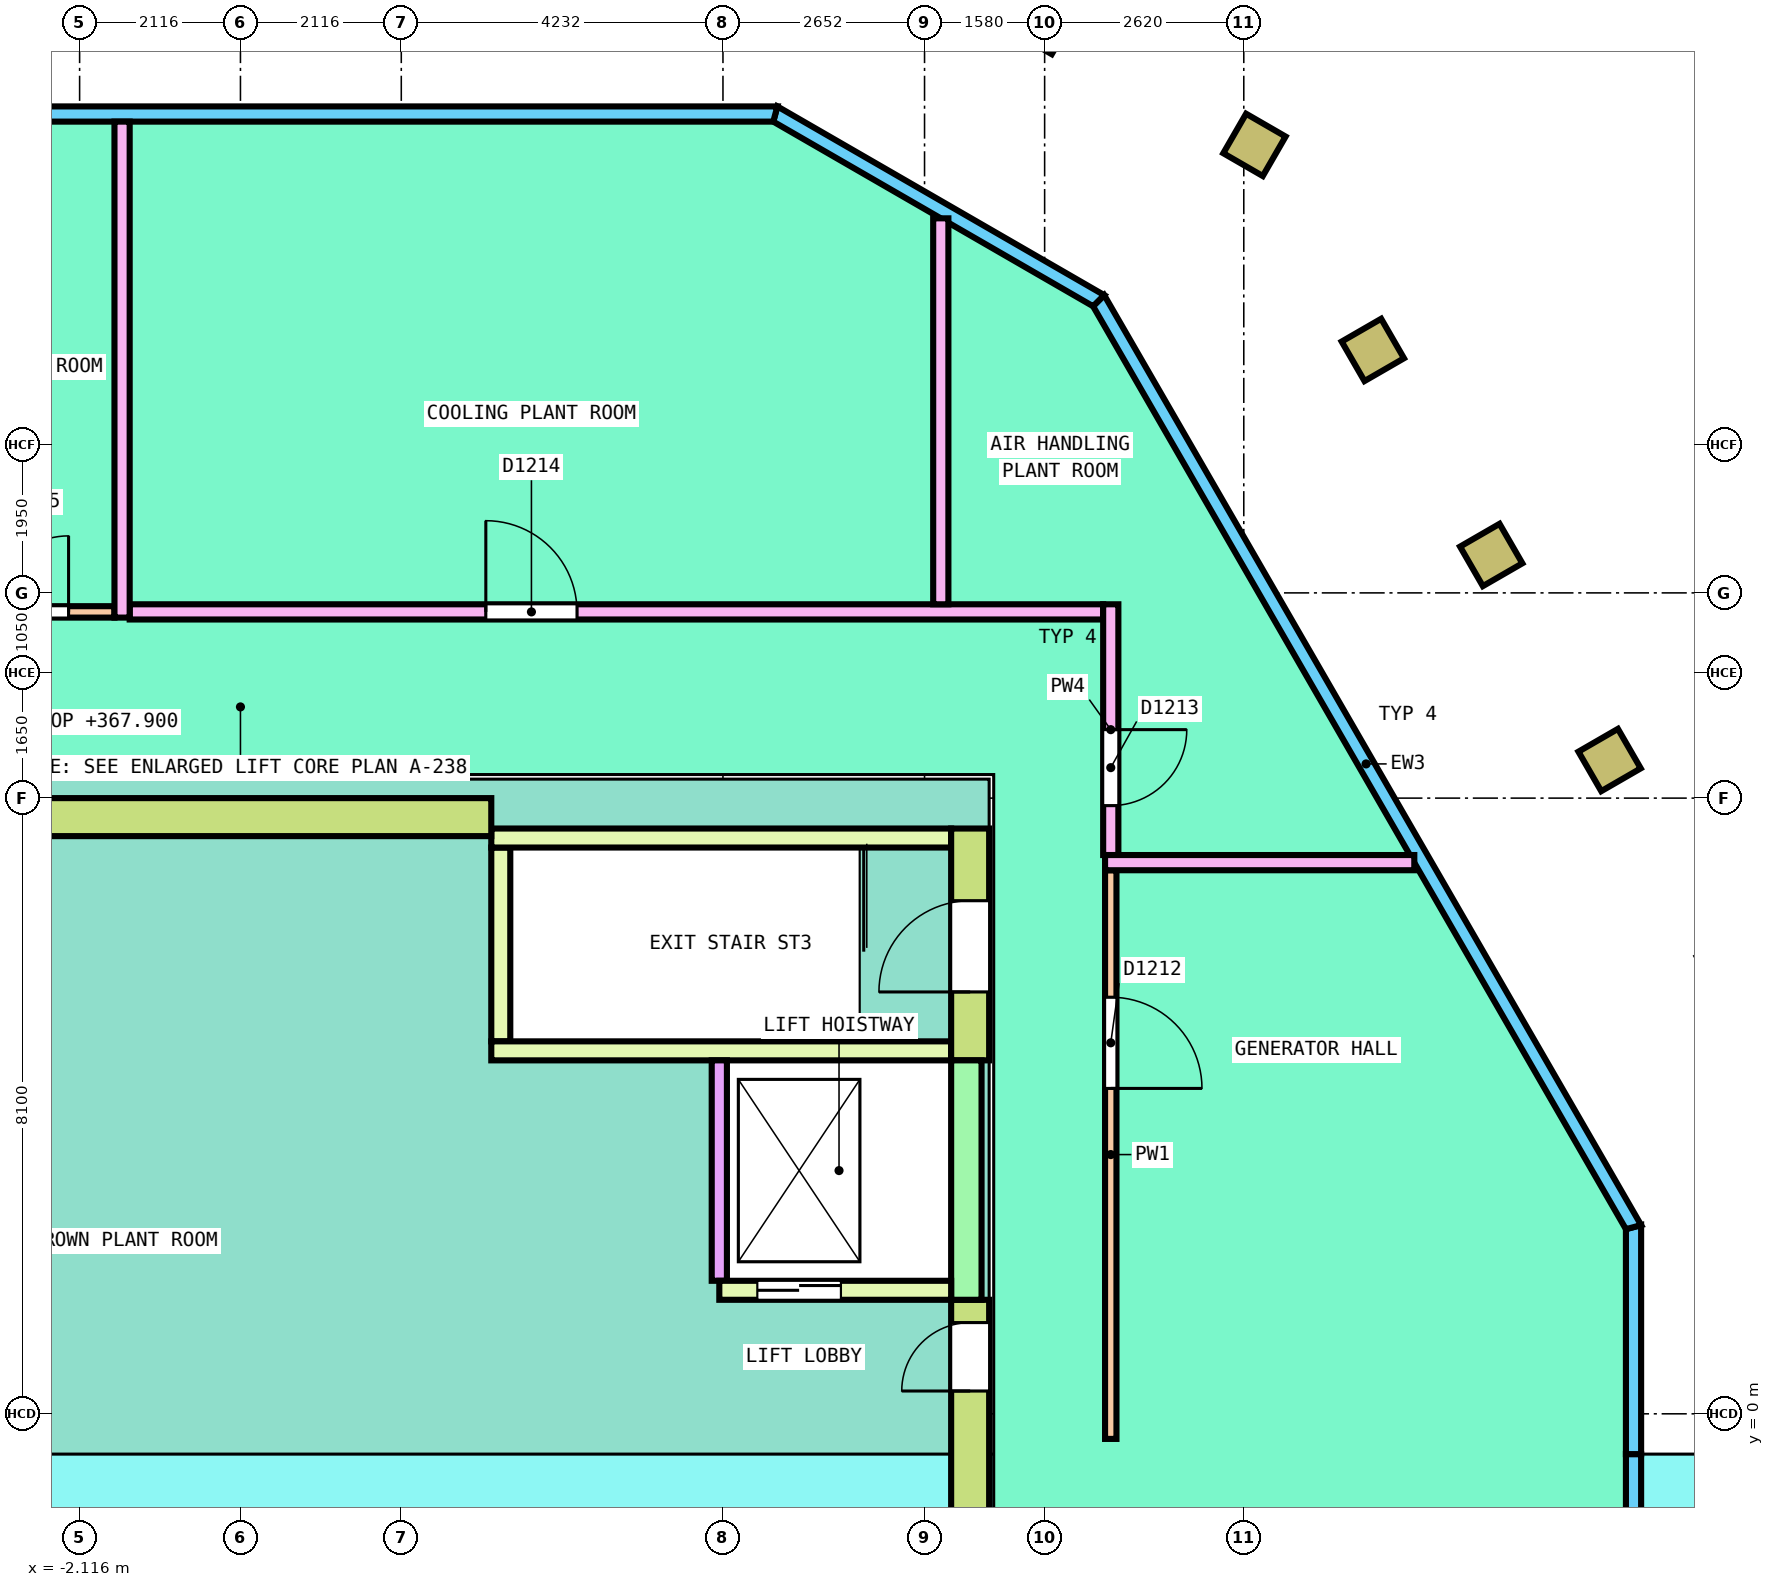
"""IFC4 building model, lengths in metres.
Left out: names, types, materials, properties, quantities, classifications, styles, units other than length and angle.
Written with IfcOpenShell. Run it as: python <this file> out.ifc"""

import sys

from ifc_helpers import new_model, si_unit, direction, frame, frame_2d, origin, origin_2d, place, context, subcontext, project, spatial, polyline, rectangle, hollow_rectangle, outline, extrude, element, fill, save


model = new_model("IFC4")
c1 = context("Model", 3, precision=1e-05, world=origin(), true_north=direction((0.0, 1.0)))
c2 = subcontext(c1, "Body", "Model", "MODEL_VIEW")
j1 = project(units=[si_unit("LENGTHUNIT", "METRE"), si_unit("PLANEANGLEUNIT", "RADIAN")], contexts=[c1])
p1 = place(None, origin())
s1 = spatial("IfcSite", under=j1, at=p1, CompositionType="ELEMENT")
p2 = place(p1, origin())
s2 = spatial("IfcBuilding", under=s1, at=p2, CompositionType="ELEMENT")
p3 = place(p2, frame((0.0, 0.0, 364.6)))
s3 = spatial("IfcBuildingStorey", under=s2, at=p3, CompositionType="ELEMENT", Elevation=364.6)
for number, where, z_axis, x_axis in (
    (1, (18.013, 8.601, 0.0), (0.0, 0.0, 1.0), (-0.5, 0.866, 0.0)),
    (2, (16.455, 11.299, 0.0), (0.0, 0.0, 1.0), (-0.5, 0.866, 0.0)),
    (3, (14.898, 13.996, 0.0), (0.0, 0.0, 1.0), (-0.5, 0.866, 0.0)),
    (4, (13.34, 16.694, 0.0), (0.0, 0.0, 1.0), (-0.866, 0.5, 0.0)),
):
    element("IfcColumn", number, at=place(p3, frame(where, z_axis=z_axis, x_axis=x_axis)), inside=s3, PredefinedType="COLUMN", context=c2, shape_type="SweptSolid", body=[
        extrude(hollow_rectangle(XDim=0.6, YDim=0.6, WallThickness=0.04, InnerFilletRadius=0.04, OuterFilletRadius=0.08, at=origin_2d()), origin(), (0.0, 0.0, 1.0), 4.0),
    ])
p4 = place(p3, frame((18.327, -2.456, 0.0), z_axis=(0.0, 0.0, 1.0), x_axis=(0.0, 1.0, 0.0)))
e5 = element("IfcWall", 5, at=p4, inside=s3, PredefinedType="SOLIDWALL", context=c2, shape_type="SweptSolid", body=[
    extrude(outline(polyline([(0.0, 0.0), (1.926, 0.0), (1.926, 4.0), (0.0, 2.074), (0.0, 0.0)])), frame((0.0, 0.1, 0.0), z_axis=(0.0, -1.0, 0.0), x_axis=(1.0, 0.0, 0.0)), (0.0, 0.0, 1.0), 0.2),
])
p5 = place(p3, frame((18.327, -0.53, 0.0), z_axis=(0.0, 0.0, 1.0), x_axis=(0.0, 1.0, 0.0)))
e6 = element("IfcWall", 6, at=p5, inside=s3, PredefinedType="SOLIDWALL", context=c2, shape_type="SweptSolid", body=[
    extrude(outline(polyline([(0.0, -0.1), (3.013, -0.1), (2.959, 0.1), (0.0, 0.1), (0.0, -0.1)])), origin(), (0.0, 0.0, 1.0), 3.8),
])
p6 = place(p3, frame((18.327, 2.456, 0.0), z_axis=(0.0, 0.0, 1.0), x_axis=(-0.499991740577, 0.866030172312, 0.0)))
e7 = element("IfcWall", 7, at=p6, inside=s3, PredefinedType="SOLIDWALL", context=c2, shape_type="SweptSolid", body=[
    extrude(outline(polyline([(-0.027, -0.1), (14.101, -0.1), (14.047, 0.1), (0.027, 0.1), (-0.027, -0.1)])), origin(), (0.0, 0.0, 1.0), 3.8),
])
p7 = place(p3, frame((11.291, 14.644, 0.0), z_axis=(0.0, 0.0, 1.0), x_axis=(-0.86601671623, 0.500015046984, 0.0)))
e8 = element("IfcWall", 8, at=p7, inside=s3, PredefinedType="SOLIDWALL", context=c2, shape_type="SweptSolid", body=[
    extrude(outline(polyline([(-0.027, -0.1), (4.938, -0.1), (4.885, 0.1), (0.027, 0.1), (-0.027, -0.1)])), origin(), (0.0, 0.0, 1.0), 3.8),
])
p8 = place(p3, frame((7.037, 17.1, 0.0), z_axis=(0.0, 0.0, 1.0), x_axis=(-1.0, 0.0, 0.0)))
e9 = element("IfcWall", 9, at=p8, inside=s3, PredefinedType="SOLIDWALL", context=c2, shape_type="SweptSolid", body=[
    extrude(outline(polyline([(-0.027, -0.1), (14.101, -0.1), (14.047, 0.1), (0.027, 0.1), (-0.027, -0.1)])), origin(), (0.0, 0.0, 1.0), 3.8),
])
p9 = place(p3, frame((9.6, -4.13, 0.0), z_axis=(0.0, 0.0, 1.0), x_axis=(0.0, 1.0, 0.0)))
e10 = element("IfcWall", 10, at=p9, inside=s3, PredefinedType="SHEAR", context=c2, shape_type="SweptSolid", body=[
    extrude(outline(polyline([(0.0, 0.0), (5.63, 0.0), (5.63, 3.8), (3.6, 3.8), (0.0, 0.4), (0.0, 0.0)])), frame((0.0, 0.25, 0.0), z_axis=(0.0, -1.0, 0.0), x_axis=(1.0, 0.0, 0.0)), (0.0, 0.0, 1.0), 0.5),
])
p10 = place(p9, frame((4.43, 0.0, 0.0)))
e11 = element("IfcOpeningElement", 11, at=p10, cuts=e10, PredefinedType="OPENING", context=c2, shape_type="SweptSolid", body=[
    extrude(rectangle(XDim=0.9, YDim=2.1, at=frame_2d((0.45, 1.05))), frame((0.0, 0.26, 0.0), z_axis=(0.0, -1.0, 0.0), x_axis=(1.0, 0.0, 0.0)), (0.0, 0.0, 1.0), 0.52),
])
p11 = place(p3, frame((3.3, 7.85, 0.0), z_axis=(0.0, 0.0, 1.0), x_axis=(-1.0, 0.0, 0.0)))
e12 = element("IfcWall", 12, at=p11, inside=s3, PredefinedType="SHEAR", context=c2, shape_type="SweptSolid", body=[
    extrude(rectangle(XDim=6.6, YDim=0.5, at=frame_2d((3.3, 0.0))), origin(), (0.0, 0.0, 1.0), 3.8),
])
p12 = place(p3, frame((9.6, 4.65, 0.0), z_axis=(0.0, 0.0, 1.0), x_axis=(0.0, 1.0, 0.0)))
e13 = element("IfcWall", 13, at=p12, inside=s3, PredefinedType="SHEAR", context=c2, shape_type="SweptSolid", body=[
    extrude(rectangle(XDim=3.05, YDim=0.5, at=frame_2d((1.525, 0.0))), origin(), (0.0, 0.0, 1.0), 3.8),
])
p13 = place(p12, frame((0.9, 0.0, 0.0)))
e14 = element("IfcOpeningElement", 14, at=p13, cuts=e13, PredefinedType="OPENING", context=c2, shape_type="SweptSolid", body=[
    extrude(rectangle(XDim=1.2, YDim=2.1, at=frame_2d((0.6, 1.05))), frame((0.0, 0.26, 0.0), z_axis=(0.0, -1.0, 0.0), x_axis=(1.0, 0.0, 0.0)), (0.0, 0.0, 1.0), 0.52),
])
p14 = place(p3, frame((3.425, 4.9, 0.0), z_axis=(0.0, 0.0, 1.0), x_axis=(0.0, 1.0, 0.0)))
e15 = element("IfcWall", 15, at=p14, inside=s3, PredefinedType="SOLIDWALL", context=c2, shape_type="SweptSolid", body=[
    extrude(rectangle(XDim=2.55, YDim=0.25, at=frame_2d((1.275, 0.0))), origin(), (0.0, 0.0, 1.0), 3.8),
])
for number, where, z_axis, x_axis in (
    (16, (3.3, 4.775, 0.0), (0.0, 0.0, 1.0), (1.0, 0.0, 0.0)),
    (17, (3.3, 7.575, 0.0), (0.0, 0.0, 1.0), (1.0, 0.0, 0.0)),
):
    element("IfcWall", number, at=place(p3, frame(where, z_axis=z_axis, x_axis=x_axis)), inside=s3, PredefinedType="SOLIDWALL", context=c2, shape_type="SweptSolid", body=[
        extrude(rectangle(XDim=6.05, YDim=0.25, at=frame_2d((3.025, 0.0))), origin(), (0.0, 0.0, 1.0), 3.8),
    ])
p15 = place(p3, frame((6.3, 1.625, 0.0), z_axis=(0.0, 0.0, 1.0), x_axis=(1.0, 0.0, 0.0)))
e18 = element("IfcWall", 18, at=p15, inside=s3, PredefinedType="SOLIDWALL", context=c2, shape_type="SweptSolid", body=[
    extrude(rectangle(XDim=3.05, YDim=0.25, at=frame_2d((1.525, 0.0))), origin(), (0.0, 0.0, 1.0), 3.8),
])
p16 = place(p15, frame((0.5, 0.0, 0.0)))
e19 = element("IfcOpeningElement", 19, at=p16, cuts=e18, PredefinedType="OPENING", context=c2, shape_type="SweptSolid", body=[
    extrude(rectangle(XDim=1.1, YDim=2.1, at=frame_2d((0.55, 1.05))), frame((0.0, 0.135, 0.0), z_axis=(0.0, -1.0, 0.0), x_axis=(1.0, 0.0, 0.0)), (0.0, 0.0, 1.0), 0.27),
])
p17 = place(p3, frame((6.3, 1.75, 0.0), z_axis=(0.0, 0.0, 1.0), x_axis=(0.0, 1.0, 0.0)))
e20 = element("IfcWall", 20, at=p17, inside=s3, PredefinedType="SOLIDWALL", context=c2, shape_type="SweptSolid", body=[
    extrude(rectangle(XDim=2.9, YDim=0.2, at=frame_2d((1.45, 0.0))), origin(), (0.0, 0.0, 1.0), 3.8),
])
p18 = place(p3, frame((9.55, 1.5, 0.0), z_axis=(0.0, 0.0, 1.0), x_axis=(0.0, 1.0, 0.0)))
e21 = element("IfcWall", 21, at=p18, inside=s3, PredefinedType="SHEAR", context=c2, shape_type="SweptSolid", body=[
    extrude(rectangle(XDim=3.15, YDim=0.4, at=frame_2d((1.575, 0.0))), origin(), (0.0, 0.0, 1.0), 3.8),
])
p19 = place(p3, frame((11.45, -0.33, 0.0), z_axis=(0.0, 0.0, 1.0), x_axis=(0.0, 1.0, 0.0)))
e22 = element("IfcWall", 22, at=p19, inside=s3, PredefinedType="PARTITIONING", context=c2, shape_type="SweptSolid", body=[
    extrude(rectangle(XDim=7.481, YDim=0.15, at=frame_2d((3.741, 0.0))), origin(), (0.0, 0.0, 1.0), 3.2),
])
p20 = place(p19, frame((4.611, 0.0, 0.0)))
e23 = element("IfcOpeningElement", 23, at=p20, cuts=e22, PredefinedType="OPENING", context=c2, shape_type="SweptSolid", body=[
    extrude(rectangle(XDim=1.2, YDim=2.1, at=frame_2d((0.6, 1.05))), frame((0.0, 0.085, 0.0), z_axis=(0.0, -1.0, 0.0), x_axis=(1.0, 0.0, 0.0)), (0.0, 0.0, 1.0), 0.17),
])
p21 = place(p3, frame((-4.572, 10.55, 0.0), z_axis=(0.0, 0.0, 1.0), x_axis=(1.0, 0.0, 0.0)))
e24 = element("IfcWall", 24, at=p21, inside=s3, PredefinedType="PARTITIONING", context=c2, shape_type="SweptSolid", body=[
    extrude(rectangle(XDim=2.915, YDim=0.15, at=frame_2d((1.458, 0.0))), origin(), (0.0, 0.0, 1.0), 3.3),
])
p22 = place(p21, frame((1.311, 0.0, 0.0)))
e25 = element("IfcOpeningElement", 25, at=p22, cuts=e24, PredefinedType="OPENING", context=c2, shape_type="SweptSolid", body=[
    extrude(rectangle(XDim=1.0, YDim=2.1, at=frame_2d((0.5, 1.05))), frame((0.0, 0.085, 0.0), z_axis=(0.0, -1.0, 0.0), x_axis=(1.0, 0.0, 0.0)), (0.0, 0.0, 1.0), 0.17),
])
p23 = place(p3, frame((-1.458, 10.55, 0.0), z_axis=(0.0, 0.0, 1.0), x_axis=(1.0, 0.0, 0.0)))
e26 = element("IfcWall", 26, at=p23, inside=s3, PredefinedType="PARTITIONING", context=c2, shape_type="SweptSolid", body=[
    extrude(rectangle(XDim=12.808, YDim=0.2, at=frame_2d((6.404, 0.0))), origin(), (0.0, 0.0, 1.0), 3.3),
])
p24 = place(p23, frame((4.686, 0.0, 0.0)))
e27 = element("IfcOpeningElement", 27, at=p24, cuts=e26, PredefinedType="OPENING", context=c2, shape_type="SweptSolid", body=[
    extrude(rectangle(XDim=1.2, YDim=2.1, at=frame_2d((0.6, 1.05))), frame((0.0, 0.11, 0.0), z_axis=(0.0, -1.0, 0.0), x_axis=(1.0, 0.0, 0.0)), (0.0, 0.0, 1.0), 0.22),
])
p25 = place(p3, frame((11.45, 7.351, 0.0), z_axis=(0.0, 0.0, 1.0), x_axis=(0.0, 1.0, 0.0)))
e28 = element("IfcWall", 28, at=p25, inside=s3, PredefinedType="PARTITIONING", context=c2, shape_type="SweptSolid", body=[
    extrude(rectangle(XDim=3.299, YDim=0.2, at=frame_2d((1.649, 0.0))), origin(), (0.0, 0.0, 1.0), 3.3),
])
p26 = place(p25, frame((0.65, 0.0, 0.0)))
e29 = element("IfcOpeningElement", 29, at=p26, cuts=e28, PredefinedType="OPENING", context=c2, shape_type="SweptSolid", body=[
    extrude(rectangle(XDim=1.0, YDim=2.1, at=frame_2d((0.5, 1.05))), frame((0.0, 0.11, 0.0), z_axis=(0.0, -1.0, 0.0), x_axis=(1.0, 0.0, 0.0)), (0.0, 0.0, 1.0), 0.22),
])
p27 = place(p3, frame((11.375, 7.251, 0.0), z_axis=(0.0, 0.0, 1.0), x_axis=(1.0, 0.0, 0.0)))
e30 = element("IfcWall", 30, at=p27, inside=s3, PredefinedType="PARTITIONING", context=c2, shape_type="SweptSolid", body=[
    extrude(rectangle(XDim=4.068, YDim=0.2, at=frame_2d((2.034, 0.0))), origin(), (0.0, 0.0, 1.0), 3.3),
])
p28 = place(p3, frame((9.214, 10.65, 0.0), z_axis=(0.0, 0.0, 1.0), x_axis=(0.0, 1.0, 0.0)))
e31 = element("IfcWall", 31, at=p28, inside=s3, PredefinedType="PARTITIONING", context=c2, shape_type="SweptSolid", body=[
    extrude(rectangle(XDim=5.078, YDim=0.2, at=frame_2d((2.539, 0.0))), origin(), (0.0, 0.0, 1.0), 3.3),
])
p29 = place(p3, frame((-1.557, 10.475, 0.0), z_axis=(0.0, 0.0, 1.0), x_axis=(0.0, 1.0, 0.0)))
e32 = element("IfcWall", 32, at=p29, inside=s3, PredefinedType="PARTITIONING", context=c2, shape_type="SweptSolid", body=[
    extrude(rectangle(XDim=6.525, YDim=0.2, at=frame_2d((3.262, 0.0))), origin(), (0.0, 0.0, 1.0), 3.3),
])
p30 = place(p13, origin())
e33 = element("IfcDoor", 33, at=p30, inside=s3, OperationType="SINGLE_SWING_RIGHT", PredefinedType="DOOR", context=c2, shape_type="SweptSolid", body=[
    extrude(rectangle(XDim=1.2, YDim=2.1, at=frame_2d((0.6, 1.05))), frame((0.0, 0.2, 0.0), z_axis=(0.0, -1.0, 0.0), x_axis=(1.0, 0.0, 0.0)), (0.0, 0.0, 1.0), 0.4),
])
fill(e14, e33)
p31 = place(p16, origin())
e34 = element("IfcDoor", 34, at=p31, inside=s3, OperationType="DOUBLE_DOOR_SLIDING", PredefinedType="DOOR", context=c2, shape_type="SweptSolid", body=[
    extrude(rectangle(XDim=1.1, YDim=2.1, at=frame_2d((0.55, 1.05))), frame((0.0, 0.075, 0.0), z_axis=(0.0, -1.0, 0.0), x_axis=(1.0, 0.0, 0.0)), (0.0, 0.0, 1.0), 0.15),
])
fill(e19, e34)
p32 = place(p10, origin())
e35 = element("IfcDoor", 35, at=p32, inside=s3, OperationType="SINGLE_SWING_RIGHT", PredefinedType="DOOR", context=c2, shape_type="SweptSolid", body=[
    extrude(rectangle(XDim=0.9, YDim=2.1, at=frame_2d((0.45, 1.05))), frame((0.0, 0.2, 0.0), z_axis=(0.0, -1.0, 0.0), x_axis=(1.0, 0.0, 0.0)), (0.0, 0.0, 1.0), 0.4),
])
fill(e11, e35)
p33 = place(p20, origin())
e36 = element("IfcDoor", 36, at=p33, inside=s3, OperationType="DOUBLE_DOOR_SINGLE_SWING", PredefinedType="DOOR", context=c2, shape_type="SweptSolid", body=[
    extrude(rectangle(XDim=1.2, YDim=2.1, at=frame_2d((0.6, 1.05))), frame((0.0, 0.025, 0.0), z_axis=(0.0, -1.0, 0.0), x_axis=(1.0, 0.0, 0.0)), (0.0, 0.0, 1.0), 0.05),
])
fill(e23, e36)
p34 = place(p26, origin())
e37 = element("IfcDoor", 37, at=p34, inside=s3, OperationType="SINGLE_SWING_RIGHT", PredefinedType="DOOR", context=c2, shape_type="SweptSolid", body=[
    extrude(rectangle(XDim=1.0, YDim=2.1, at=frame_2d((0.5, 1.05))), frame((0.0, 0.025, 0.0), z_axis=(0.0, -1.0, 0.0), x_axis=(1.0, 0.0, 0.0)), (0.0, 0.0, 1.0), 0.05),
])
fill(e29, e37)
p35 = place(p24, origin())
e38 = element("IfcDoor", 38, at=p35, inside=s3, OperationType="DOUBLE_DOOR_SINGLE_SWING", PredefinedType="DOOR", context=c2, shape_type="SweptSolid", body=[
    extrude(rectangle(XDim=1.2, YDim=2.1, at=frame_2d((0.6, 1.05))), frame((0.0, 0.025, 0.0), z_axis=(0.0, -1.0, 0.0), x_axis=(1.0, 0.0, 0.0)), (0.0, 0.0, 1.0), 0.05),
])
fill(e27, e38)
p36 = place(p22, origin())
e39 = element("IfcDoor", 39, at=p36, inside=s3, OperationType="SINGLE_SWING_LEFT", PredefinedType="DOOR", context=c2, shape_type="SweptSolid", body=[
    extrude(rectangle(XDim=1.0, YDim=2.1, at=frame_2d((0.5, 1.05))), frame((0.0, 0.025, 0.0), z_axis=(0.0, -1.0, 0.0), x_axis=(1.0, 0.0, 0.0)), (0.0, 0.0, 1.0), 0.05),
])
fill(e25, e39)
save(model, sys.argv[1])
